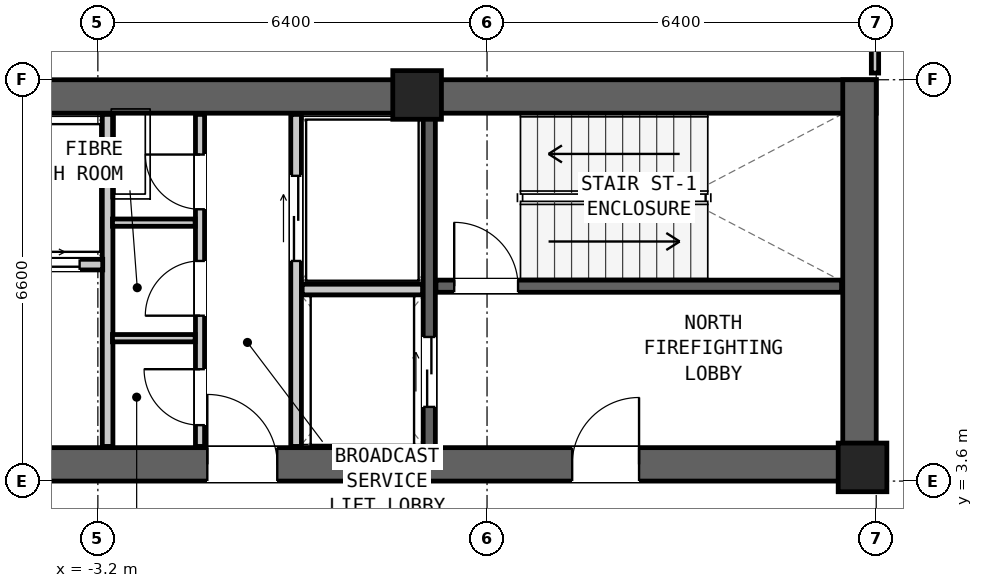
"""IFC4 building model, lengths in metres.
Left out: names, types, materials, properties, quantities, classifications, styles, units other than length and angle.
Written with IfcOpenShell. Run it as: python <this file> out.ifc"""

import sys

from ifc_helpers import new_model, si_unit, direction, frame, frame_2d, origin, origin_2d, place, context, subcontext, project, spatial, rectangle, extrude, element, fill, save


model = new_model("IFC4")
c1 = context("Model", 3, precision=1e-05, world=origin(), true_north=direction((0.0, 1.0)))
c2 = subcontext(c1, "Body", "Model", "MODEL_VIEW")
j1 = project(units=[si_unit("LENGTHUNIT", "METRE"), si_unit("PLANEANGLEUNIT", "RADIAN")], contexts=[c1])
p1 = place(None, origin())
s1 = spatial("IfcSite", under=j1, at=p1, CompositionType="ELEMENT")
p2 = place(p1, origin())
s2 = spatial("IfcBuilding", under=s1, at=p2, CompositionType="ELEMENT")
p3 = place(p2, frame((0.0, 0.0, 13.5)))
s3 = spatial("IfcBuildingStorey", under=s2, at=p3, CompositionType="ELEMENT", Elevation=13.5)
p4 = place(p3, frame((-9.6, 9.925, 0.0), z_axis=(0.0, 0.0, 1.0), x_axis=(1.0, 0.0, 0.0)))
e1 = element("IfcWall", 1, at=p4, inside=s3, PredefinedType="SHEAR", context=c2, shape_type="SweptSolid", body=[
    extrude(rectangle(XDim=19.2, YDim=0.55, at=frame_2d((9.6, 0.0))), origin(), (0.0, 0.0, 1.0), 4.2),
])
p5 = place(p3, frame((-9.6, 3.875, 0.0), z_axis=(0.0, 0.0, 1.0), x_axis=(1.0, 0.0, 0.0)))
e2 = element("IfcWall", 2, at=p5, inside=s3, PredefinedType="SHEAR", context=c2, shape_type="SweptSolid", body=[
    extrude(rectangle(XDim=19.2, YDim=0.55, at=frame_2d((9.6, 0.0))), origin(), (0.0, 0.0, 1.0), 4.2),
])
p6 = place(p5, frame((14.2, 0.0, 0.0)))
e3 = element("IfcOpeningElement", 3, at=p6, cuts=e2, PredefinedType="OPENING", context=c2, shape_type="SweptSolid", body=[
    extrude(rectangle(XDim=1.1, YDim=2.08, at=frame_2d((0.55, 1.04))), frame((0.0, 0.287, 0.0), z_axis=(0.0, -1.0, 0.0), x_axis=(1.0, 0.0, 0.0)), (0.0, 0.0, 1.0), 0.574),
])
p7 = place(p5, frame((8.2, 0.0, 0.0)))
e4 = element("IfcOpeningElement", 4, at=p7, cuts=e2, PredefinedType="OPENING", context=c2, shape_type="SweptSolid", body=[
    extrude(rectangle(XDim=1.15, YDim=2.1, at=frame_2d((0.575, 1.05))), frame((0.0, 0.287, 0.0), z_axis=(0.0, -1.0, 0.0), x_axis=(1.0, 0.0, 0.0)), (0.0, 0.0, 1.0), 0.574),
])
p8 = place(p5, frame((0.9, 0.0, 0.0)))
e5 = element("IfcOpeningElement", 5, at=p8, cuts=e2, PredefinedType="OPENING", context=c2, shape_type="SweptSolid", body=[
    extrude(rectangle(XDim=0.95, YDim=2.1, at=frame_2d((0.475, 1.05))), frame((0.0, 0.287, 0.0), z_axis=(0.0, -1.0, 0.0), x_axis=(1.0, 0.0, 0.0)), (0.0, 0.0, 1.0), 0.574),
])
p9 = place(p5, frame((3.6, 0.0, 0.0)))
e6 = element("IfcOpeningElement", 6, at=p9, cuts=e2, PredefinedType="OPENING", context=c2, shape_type="SweptSolid", body=[
    extrude(rectangle(XDim=1.6, YDim=2.12, at=frame_2d((0.8, 1.06))), frame((0.0, 0.287, 0.0), z_axis=(0.0, -1.0, 0.0), x_axis=(1.0, 0.0, 0.0)), (0.0, 0.0, 1.0), 0.574),
])
p10 = place(p3, frame((9.325, 3.6, 0.0), z_axis=(0.0, 0.0, 1.0), x_axis=(0.0, 1.0, 0.0)))
e7 = element("IfcWall", 7, at=p10, inside=s3, PredefinedType="SHEAR", context=c2, shape_type="SweptSolid", body=[
    extrude(rectangle(XDim=6.6, YDim=0.55, at=frame_2d((3.3, 0.0))), origin(), (0.0, 0.0, 1.0), 4.2),
])
for number, where, z_axis, x_axis in (
    (8, (2.05, 9.95, 0.0), (0.0, 0.0, 1.0), (1.0, 0.0, 0.0)),
    (9, (9.375, 3.825, 0.0), (0.0, 0.0, 1.0), (1.0, 0.0, 0.0)),
):
    element("IfcColumn", number, at=place(p3, frame(where, z_axis=z_axis, x_axis=x_axis)), inside=s3, PredefinedType="COLUMN", context=c2, shape_type="SweptSolid", body=[
        extrude(rectangle(XDim=0.8, YDim=0.8, at=origin_2d()), origin(), (0.0, 0.0, 1.0), 4.2),
    ])
p11 = place(p3, frame((2.36, 6.805, 0.0), z_axis=(0.0, 0.0, 1.0), x_axis=(1.0, 0.0, 0.0)))
e10 = element("IfcWall", 10, at=p11, inside=s3, PredefinedType="SHEAR", context=c2, shape_type="SweptSolid", body=[
    extrude(rectangle(XDim=6.67, YDim=0.2, at=frame_2d((3.335, 0.0))), origin(), (0.0, 0.0, 1.0), 3.88),
])
p12 = place(p11, frame((0.3, 0.0, 0.0)))
e11 = element("IfcOpeningElement", 11, at=p12, cuts=e10, PredefinedType="OPENING", context=c2, shape_type="SweptSolid", body=[
    extrude(rectangle(XDim=1.05, YDim=2.08, at=frame_2d((0.525, 1.04))), frame((0.0, 0.112, 0.0), z_axis=(0.0, -1.0, 0.0), x_axis=(1.0, 0.0, 0.0)), (0.0, 0.0, 1.0), 0.224),
])
p13 = place(p3, frame((2.25, 4.17, 0.0), z_axis=(0.0, 0.0, 1.0), x_axis=(0.0, 1.0, 0.0)))
e12 = element("IfcWall", 12, at=p13, inside=s3, PredefinedType="SHEAR", context=c2, shape_type="SweptSolid", body=[
    extrude(rectangle(XDim=5.46, YDim=0.2, at=frame_2d((2.73, 0.0))), origin(), (0.0, 0.0, 1.0), 3.88),
])
p14 = place(p13, frame((0.65, 0.0, 0.0)))
e13 = element("IfcOpeningElement", 13, at=p14, cuts=e12, PredefinedType="OPENING", context=c2, shape_type="SweptSolid", body=[
    extrude(rectangle(XDim=1.15, YDim=2.08, at=frame_2d((0.575, 1.04))), frame((0.0, 0.112, 0.0), z_axis=(0.0, -1.0, 0.0), x_axis=(1.0, 0.0, 0.0)), (0.0, 0.0, 1.0), 0.224),
])
p15 = place(p3, frame((0.06, 4.17, 0.0), z_axis=(0.0, 0.0, 1.0), x_axis=(0.0, 1.0, 0.0)))
e14 = element("IfcWall", 14, at=p15, inside=s3, PredefinedType="PARTITIONING", context=c2, shape_type="SweptSolid", body=[
    extrude(rectangle(XDim=5.46, YDim=0.175, at=frame_2d((2.73, 0.0))), origin(), (0.0, 0.0, 1.0), 3.88),
])
p16 = place(p15, frame((3.05, 0.0, 0.0)))
e15 = element("IfcOpeningElement", 15, at=p16, cuts=e14, PredefinedType="OPENING", context=c2, shape_type="SweptSolid", body=[
    extrude(rectangle(XDim=1.4, YDim=2.12, at=frame_2d((0.7, 1.06))), frame((0.0, 0.1, 0.0), z_axis=(0.0, -1.0, 0.0), x_axis=(1.0, 0.0, 0.0)), (0.0, 0.0, 1.0), 0.199),
])
p17 = place(p3, frame((0.16, 6.75, 0.0), z_axis=(0.0, 0.0, 1.0), x_axis=(1.0, 0.0, 0.0)))
e16 = element("IfcWall", 16, at=p17, inside=s3, PredefinedType="PARTITIONING", context=c2, shape_type="SweptSolid", body=[
    extrude(rectangle(XDim=1.98, YDim=0.175, at=frame_2d((0.99, 0.0))), origin(), (0.0, 0.0, 1.0), 3.88),
])
p18 = place(p3, frame((-3.04, 4.17, 0.0), z_axis=(0.0, 0.0, 1.0), x_axis=(0.0, 1.0, 0.0)))
e17 = element("IfcWall", 17, at=p18, inside=s3, PredefinedType="PARTITIONING", context=c2, shape_type="SweptSolid", body=[
    extrude(rectangle(XDim=5.46, YDim=0.175, at=frame_2d((2.73, 0.0))), origin(), (0.0, 0.0, 1.0), 3.88),
])
p19 = place(p3, frame((-1.52, 4.17, 0.0), z_axis=(0.0, 0.0, 1.0), x_axis=(0.0, 1.0, 0.0)))
e18 = element("IfcWall", 18, at=p19, inside=s3, PredefinedType="PARTITIONING", context=c2, shape_type="SweptSolid", body=[
    extrude(rectangle(XDim=5.46, YDim=0.15, at=frame_2d((2.73, 0.0))), origin(), (0.0, 0.0, 1.0), 3.88),
])
p20 = place(p19, frame((3.9, 0.0, 0.0)))
e19 = element("IfcOpeningElement", 19, at=p20, cuts=e18, PredefinedType="OPENING", context=c2, shape_type="SweptSolid", body=[
    extrude(rectangle(XDim=0.9, YDim=2.05, at=frame_2d((0.45, 1.025))), frame((0.0, 0.087, 0.0), z_axis=(0.0, -1.0, 0.0), x_axis=(1.0, 0.0, 0.0)), (0.0, 0.0, 1.0), 0.174),
])
p21 = place(p19, frame((2.15, 0.0, 0.0)))
e20 = element("IfcOpeningElement", 20, at=p21, cuts=e18, PredefinedType="OPENING", context=c2, shape_type="SweptSolid", body=[
    extrude(rectangle(XDim=0.9, YDim=2.05, at=frame_2d((0.45, 1.025))), frame((0.0, 0.087, 0.0), z_axis=(0.0, -1.0, 0.0), x_axis=(1.0, 0.0, 0.0)), (0.0, 0.0, 1.0), 0.174),
])
p22 = place(p19, frame((0.35, 0.0, 0.0)))
e21 = element("IfcOpeningElement", 21, at=p22, cuts=e18, PredefinedType="OPENING", context=c2, shape_type="SweptSolid", body=[
    extrude(rectangle(XDim=0.92, YDim=2.1, at=frame_2d((0.46, 1.05))), frame((0.0, 0.087, 0.0), z_axis=(0.0, -1.0, 0.0), x_axis=(1.0, 0.0, 0.0)), (0.0, 0.0, 1.0), 0.174),
])
for number, where, z_axis, x_axis in (
    (22, (-2.96, 5.95, 0.0), (0.0, 0.0, 1.0), (1.0, 0.0, 0.0)),
    (23, (-2.96, 7.85, 0.0), (0.0, 0.0, 1.0), (1.0, 0.0, 0.0)),
):
    element("IfcWall", number, at=place(p3, frame(where, z_axis=z_axis, x_axis=x_axis)), inside=s3, PredefinedType="PARTITIONING", context=c2, shape_type="SweptSolid", body=[
        extrude(rectangle(XDim=1.36, YDim=0.12, at=frame_2d((0.68, 0.0))), origin(), (0.0, 0.0, 1.0), 3.88),
    ])
p23 = place(p3, frame((-9.03, 7.16, 0.0), z_axis=(0.0, 0.0, 1.0), x_axis=(1.0, 0.0, 0.0)))
e24 = element("IfcWall", 24, at=p23, inside=s3, PredefinedType="PARTITIONING", context=c2, shape_type="SweptSolid", body=[
    extrude(rectangle(XDim=5.91, YDim=0.175, at=frame_2d((2.955, 0.0))), origin(), (0.0, 0.0, 1.0), 3.88),
])
p24 = place(p23, frame((0.43, 0.0, 0.0)))
e25 = element("IfcOpeningElement", 25, at=p24, cuts=e24, PredefinedType="OPENING", context=c2, shape_type="SweptSolid", body=[
    extrude(rectangle(XDim=1.1, YDim=2.06, at=frame_2d((0.55, 1.03))), frame((0.0, 0.1, 0.0), z_axis=(0.0, -1.0, 0.0), x_axis=(1.0, 0.0, 0.0)), (0.0, 0.0, 1.0), 0.199),
])
p25 = place(p23, frame((2.43, 0.0, 0.0)))
e26 = element("IfcOpeningElement", 26, at=p25, cuts=e24, PredefinedType="OPENING", context=c2, shape_type="SweptSolid", body=[
    extrude(rectangle(XDim=1.1, YDim=2.06, at=frame_2d((0.55, 1.03))), frame((0.0, 0.1, 0.0), z_axis=(0.0, -1.0, 0.0), x_axis=(1.0, 0.0, 0.0)), (0.0, 0.0, 1.0), 0.199),
])
p26 = place(p23, frame((4.43, 0.0, 0.0)))
e27 = element("IfcOpeningElement", 27, at=p26, cuts=e24, PredefinedType="OPENING", context=c2, shape_type="SweptSolid", body=[
    extrude(rectangle(XDim=1.1, YDim=2.06, at=frame_2d((0.55, 1.03))), frame((0.0, 0.1, 0.0), z_axis=(0.0, -1.0, 0.0), x_axis=(1.0, 0.0, 0.0)), (0.0, 0.0, 1.0), 0.199),
])
p27 = place(p3, frame((9.58, 10.31, 0.0), z_axis=(0.0, 0.0, 1.0), x_axis=(0.0, 1.0, 0.0)))
e28 = element("IfcWall", 28, at=p27, inside=s3, PredefinedType="PARTITIONING", context=c2, shape_type="SweptSolid", body=[
    extrude(rectangle(XDim=2.28, YDim=0.12, at=frame_2d((1.14, 0.0))), origin(), (0.0, 0.0, 1.0), 3.88),
])
p28 = place(p12, origin())
e29 = element("IfcDoor", 29, at=p28, inside=s3, OperationType="SINGLE_SWING_LEFT", PredefinedType="DOOR", context=c2, shape_type="SweptSolid", body=[
    extrude(rectangle(XDim=1.05, YDim=2.08, at=frame_2d((0.525, 1.04))), frame((0.0, 0.025, 0.0), z_axis=(0.0, -1.0, 0.0), x_axis=(1.0, 0.0, 0.0)), (0.0, 0.0, 1.0), 0.05),
])
fill(e11, e29)
p29 = place(p6, origin())
e30 = element("IfcDoor", 30, at=p29, inside=s3, OperationType="SINGLE_SWING_RIGHT", PredefinedType="DOOR", context=c2, shape_type="SweptSolid", body=[
    extrude(rectangle(XDim=1.1, YDim=2.08, at=frame_2d((0.55, 1.04))), frame((0.0, 0.025, 0.0), z_axis=(0.0, -1.0, 0.0), x_axis=(1.0, 0.0, 0.0)), (0.0, 0.0, 1.0), 0.05),
])
fill(e3, e30)
p30 = place(p14, origin())
e31 = element("IfcDoor", 31, at=p30, inside=s3, OperationType="DOUBLE_DOOR_SLIDING", PredefinedType="DOOR", context=c2, shape_type="SweptSolid", body=[
    extrude(rectangle(XDim=1.15, YDim=2.08, at=frame_2d((0.575, 1.04))), frame((0.0, 0.025, 0.0), z_axis=(0.0, -1.0, 0.0), x_axis=(1.0, 0.0, 0.0)), (0.0, 0.0, 1.0), 0.05),
])
fill(e13, e31)
p31 = place(p16, origin())
e32 = element("IfcDoor", 32, at=p31, inside=s3, OperationType="DOUBLE_DOOR_SLIDING", PredefinedType="DOOR", context=c2, shape_type="SweptSolid", body=[
    extrude(rectangle(XDim=1.4, YDim=2.12, at=frame_2d((0.7, 1.06))), frame((0.0, 0.025, 0.0), z_axis=(0.0, -1.0, 0.0), x_axis=(1.0, 0.0, 0.0)), (0.0, 0.0, 1.0), 0.05),
])
fill(e15, e32)
p32 = place(p7, origin())
e33 = element("IfcDoor", 33, at=p32, inside=s3, OperationType="SINGLE_SWING_LEFT", PredefinedType="DOOR", context=c2, shape_type="SweptSolid", body=[
    extrude(rectangle(XDim=1.15, YDim=2.1, at=frame_2d((0.575, 1.05))), frame((0.0, 0.025, 0.0), z_axis=(0.0, -1.0, 0.0), x_axis=(1.0, 0.0, 0.0)), (0.0, 0.0, 1.0), 0.05),
])
fill(e4, e33)
p33 = place(p20, origin())
e34 = element("IfcDoor", 34, at=p33, inside=s3, OperationType="SINGLE_SWING_RIGHT", PredefinedType="DOOR", context=c2, shape_type="SweptSolid", body=[
    extrude(rectangle(XDim=0.9, YDim=2.05, at=frame_2d((0.45, 1.025))), frame((0.0, 0.025, 0.0), z_axis=(0.0, -1.0, 0.0), x_axis=(1.0, 0.0, 0.0)), (0.0, 0.0, 1.0), 0.05),
])
fill(e19, e34)
p34 = place(p21, origin())
e35 = element("IfcDoor", 35, at=p34, inside=s3, OperationType="SINGLE_SWING_LEFT", PredefinedType="DOOR", context=c2, shape_type="SweptSolid", body=[
    extrude(rectangle(XDim=0.9, YDim=2.05, at=frame_2d((0.45, 1.025))), frame((0.0, 0.025, 0.0), z_axis=(0.0, -1.0, 0.0), x_axis=(1.0, 0.0, 0.0)), (0.0, 0.0, 1.0), 0.05),
])
fill(e20, e35)
p35 = place(p22, origin())
e36 = element("IfcDoor", 36, at=p35, inside=s3, OperationType="SINGLE_SWING_RIGHT", PredefinedType="DOOR", context=c2, shape_type="SweptSolid", body=[
    extrude(rectangle(XDim=0.92, YDim=2.1, at=frame_2d((0.46, 1.05))), frame((0.0, 0.025, 0.0), z_axis=(0.0, -1.0, 0.0), x_axis=(1.0, 0.0, 0.0)), (0.0, 0.0, 1.0), 0.05),
])
fill(e21, e36)
p36 = place(p26, origin())
e37 = element("IfcDoor", 37, at=p36, inside=s3, OperationType="DOUBLE_DOOR_SLIDING", PredefinedType="DOOR", context=c2, shape_type="SweptSolid", body=[
    extrude(rectangle(XDim=1.1, YDim=2.06, at=frame_2d((0.55, 1.03))), frame((0.0, 0.025, 0.0), z_axis=(0.0, -1.0, 0.0), x_axis=(1.0, 0.0, 0.0)), (0.0, 0.0, 1.0), 0.05),
])
fill(e27, e37)
save(model, sys.argv[1])
